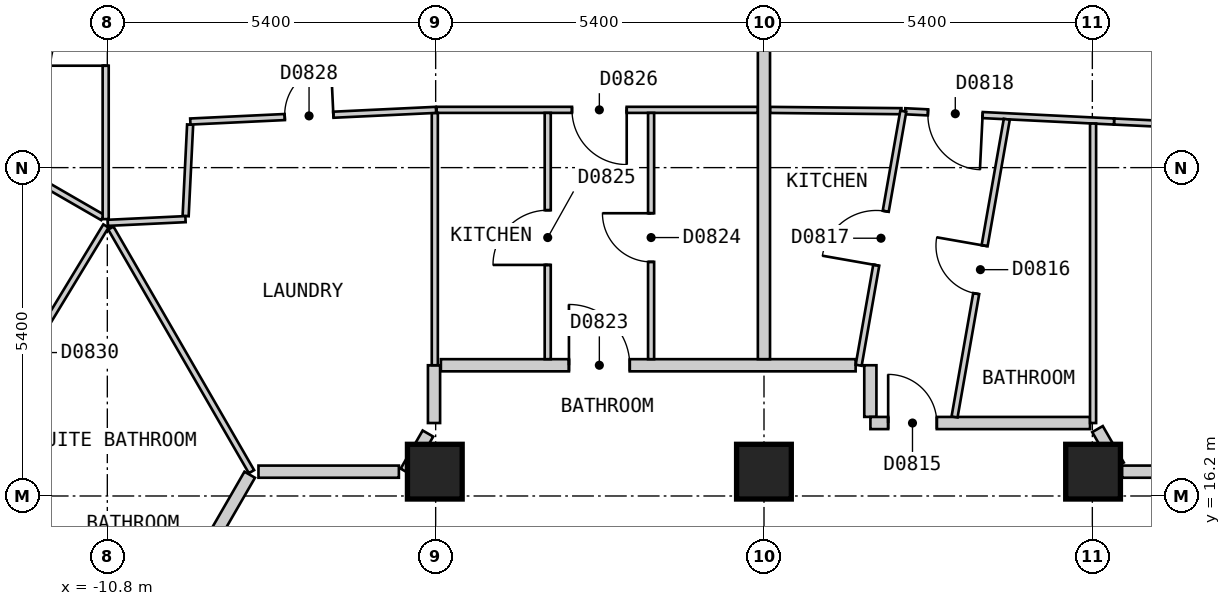
"""IFC4 building model, lengths in metres.
Left out: names, types, materials, properties, quantities, classifications, styles, units other than length and angle.
Written with IfcOpenShell. Run it as: python <this file> out.ifc"""

import sys

from ifc_helpers import new_model, si_unit, direction, frame, frame_2d, origin, origin_2d, place, context, subcontext, project, spatial, rectangle, extrude, element, fill, save


model = new_model("IFC4")
c1 = context("Model", 3, precision=1e-05, world=origin(), true_north=direction((0.0, 1.0)))
c2 = subcontext(c1, "Body", "Model", "MODEL_VIEW")
j1 = project(units=[si_unit("LENGTHUNIT", "METRE"), si_unit("PLANEANGLEUNIT", "RADIAN")], contexts=[c1])
p1 = place(None, origin())
s1 = spatial("IfcSite", under=j1, at=p1, CompositionType="ELEMENT")
p2 = place(p1, origin())
s2 = spatial("IfcBuilding", under=s1, at=p2, CompositionType="ELEMENT")
p3 = place(p2, frame((0.0, 0.0, 84.0)))
s3 = spatial("IfcBuildingStorey", under=s2, at=p3, CompositionType="ELEMENT", Elevation=84.0)
for number, where, z_axis, x_axis in (
    (1, (5.412, 16.6, 0.0), (0.0, 0.0, 1.0), (-1.0, 0.0, 0.0)),
    (2, (-0.001, 16.6, 0.0), (0.0, 0.0, 1.0), (-1.0, 0.0, 0.0)),
    (3, (-5.414, 16.6, 0.0), (0.0, 0.0, 1.0), (-1.0, 0.0, 0.0)),
):
    element("IfcColumn", number, at=place(p3, frame(where, z_axis=z_axis, x_axis=x_axis)), inside=s3, PredefinedType="COLUMN", context=c2, shape_type="SweptSolid", body=[
        extrude(rectangle(XDim=0.9, YDim=0.9, at=origin_2d()), origin(), (0.0, 0.0, 1.0), 3.0),
    ])
p4 = place(p3, frame((5.485, 17.3, 0.0), z_axis=(0.0, 0.0, 1.0), x_axis=(0.499437640892, -0.866349838611, 0.0)))
e4 = element("IfcWall", 4, at=p4, inside=s3, PredefinedType="PARTITIONING", context=c2, shape_type="SweptSolid", body=[
    extrude(rectangle(XDim=0.693, YDim=0.2, at=frame_2d((0.346, 0.0))), origin(), (0.0, 0.0, 1.0), 2.7),
])
p5 = place(p3, frame((1.749, 18.35, 0.0), z_axis=(0.0, 0.0, 1.0), x_axis=(0.0, -1.0, 0.0)))
e5 = element("IfcWall", 5, at=p5, inside=s3, PredefinedType="PARTITIONING", context=c2, shape_type="SweptSolid", body=[
    extrude(rectangle(XDim=0.849, YDim=0.2, at=frame_2d((0.425, 0.0))), origin(), (0.0, 0.0, 1.0), 2.7),
])
p6 = place(p3, frame((-8.314, 16.6, 0.0), z_axis=(0.0, 0.0, 1.0), x_axis=(1.0, 0.0, 0.0)))
e6 = element("IfcWall", 6, at=p6, inside=s3, PredefinedType="PARTITIONING", context=c2, shape_type="SweptSolid", body=[
    extrude(rectangle(XDim=2.309, YDim=0.2, at=frame_2d((1.155, 0.0))), origin(), (0.0, 0.0, 1.0), 2.7),
])
p7 = place(p3, frame((5.889, 16.6, 0.0), z_axis=(0.0, 0.0, 1.0), x_axis=(1.0, 0.0, 0.0)))
e7 = element("IfcWall", 7, at=p7, inside=s3, PredefinedType="PARTITIONING", context=c2, shape_type="SweptSolid", body=[
    extrude(rectangle(XDim=2.483, YDim=0.2, at=frame_2d((1.242, 0.0))), origin(), (0.0, 0.0, 1.0), 2.7),
])
p8 = place(p3, frame((1.75, 17.4, 0.0), z_axis=(0.0, 0.0, 1.0), x_axis=(1.0, 0.0, 0.0)))
e8 = element("IfcWall", 8, at=p8, inside=s3, PredefinedType="PARTITIONING", context=c2, shape_type="SweptSolid", body=[
    extrude(rectangle(XDim=3.612, YDim=0.2, at=frame_2d((1.806, 0.0))), origin(), (0.0, 0.0, 1.0), 2.7),
])
p9 = place(p8, frame((0.292, 0.0, 0.0)))
e9 = element("IfcOpeningElement", 9, at=p9, cuts=e8, PredefinedType="OPENING", context=c2, shape_type="SweptSolid", body=[
    extrude(rectangle(XDim=0.8, YDim=2.1, at=frame_2d((0.4, 1.05))), frame((0.0, 0.11, 0.0), z_axis=(0.0, -1.0, 0.0), x_axis=(1.0, 0.0, 0.0)), (0.0, 0.0, 1.0), 0.22),
])
p10 = place(p3, frame((-5.314, 18.35, 0.0), z_axis=(0.0, 0.0, 1.0), x_axis=(1.0, 0.0, 0.0)))
e10 = element("IfcWall", 10, at=p10, inside=s3, PredefinedType="PARTITIONING", context=c2, shape_type="SweptSolid", body=[
    extrude(rectangle(XDim=6.821, YDim=0.2, at=frame_2d((3.411, 0.0))), origin(), (0.0, 0.0, 1.0), 2.7),
])
p11 = place(p10, frame((2.106, 0.0, 0.0)))
e11 = element("IfcOpeningElement", 11, at=p11, cuts=e10, PredefinedType="OPENING", context=c2, shape_type="SweptSolid", body=[
    extrude(rectangle(XDim=1.0, YDim=2.1, at=frame_2d((0.5, 1.05))), frame((0.0, 0.11, 0.0), z_axis=(0.0, -1.0, 0.0), x_axis=(1.0, 0.0, 0.0)), (0.0, 0.0, 1.0), 0.22),
])
p12 = place(p3, frame((-5.889, 16.6, 0.0), z_axis=(0.0, 0.0, 1.0), x_axis=(0.499839240638, 0.866118198353, 0.0)))
e12 = element("IfcWall", 12, at=p12, inside=s3, PredefinedType="PARTITIONING", context=c2, shape_type="SweptSolid", body=[
    extrude(rectangle(XDim=0.724, YDim=0.2, at=frame_2d((0.362, 0.0))), origin(), (0.0, 0.0, 1.0), 2.7),
])
p13 = place(p3, frame((-18.562, -0.951, 0.0), z_axis=(0.0, 0.0, 1.0), x_axis=(0.499992962407, 0.866029466902, 0.0)))
e13 = element("IfcWall", 13, at=p13, inside=s3, PredefinedType="PARTITIONING", context=c2, shape_type="SweptSolid", body=[
    extrude(rectangle(XDim=20.208, YDim=0.2, at=frame_2d((10.104, 0.0))), origin(), (0.0, 0.0, 1.0), 2.7),
])
p14 = place(p13, frame((14.627, 0.0, 0.0)))
e14 = element("IfcOpeningElement", 14, at=p14, cuts=e13, PredefinedType="OPENING", context=c2, shape_type="SweptSolid", body=[
    extrude(rectangle(XDim=1.0, YDim=2.1, at=frame_2d((0.5, 1.05))), frame((0.0, 0.11, 0.0), z_axis=(0.0, -1.0, 0.0), x_axis=(1.0, 0.0, 0.0)), (0.0, 0.0, 1.0), 0.22),
])
p15 = place(p13, frame((4.581, 0.0, 0.0)))
e15 = element("IfcOpeningElement", 15, at=p15, cuts=e13, PredefinedType="OPENING", context=c2, shape_type="SweptSolid", body=[
    extrude(rectangle(XDim=1.0, YDim=2.1, at=frame_2d((0.5, 1.05))), frame((0.0, 0.11, 0.0), z_axis=(0.0, -1.0, 0.0), x_axis=(1.0, 0.0, 0.0)), (0.0, 0.0, 1.0), 0.22),
])
p16 = place(p3, frame((-5.427, 17.4, 0.0), z_axis=(0.0, 0.0, 1.0), x_axis=(0.0, 1.0, 0.0)))
e16 = element("IfcWall", 16, at=p16, inside=s3, PredefinedType="PARTITIONING", context=c2, shape_type="SweptSolid", body=[
    extrude(rectangle(XDim=0.95, YDim=0.2, at=frame_2d((0.475, 0.0))), origin(), (0.0, 0.0, 1.0), 2.7),
])
p17 = place(p3, frame((0.099, 22.549, 0.0), z_axis=(0.0, 0.0, 1.0), x_axis=(0.99995279897, -0.009715957599, 0.0)))
e17 = element("IfcWall", 17, at=p17, inside=s3, PredefinedType="PARTITIONING", context=c2, shape_type="SweptSolid", body=[
    extrude(rectangle(XDim=2.161, YDim=0.1, at=frame_2d((1.081, 0.0))), origin(), (0.0, 0.0, 1.0), 2.7),
])
p18 = place(p3, frame((-10.742, 20.606, 0.0), z_axis=(0.0, 0.0, 1.0), x_axis=(0.50003312339, -0.866006279142, 0.0)))
e18 = element("IfcWall", 18, at=p18, inside=s3, PredefinedType="PARTITIONING", context=c2, shape_type="SweptSolid", body=[
    extrude(rectangle(XDim=4.626, YDim=0.1, at=frame_2d((2.313, 0.0))), origin(), (0.0, 0.0, 1.0), 2.7),
])
p19 = place(p3, frame((5.757, 22.358, 0.0), z_axis=(0.0, 0.0, 1.0), x_axis=(0.998868690804, -0.047553533316, 0.0)))
e19 = element("IfcWall", 19, at=p19, inside=s3, PredefinedType="PARTITIONING", context=c2, shape_type="SweptSolid", body=[
    extrude(rectangle(XDim=1.997, YDim=0.1, at=frame_2d((0.999, 0.0))), origin(), (0.0, 0.0, 1.0), 2.7),
])
p20 = place(p3, frame((2.321, 22.527, 0.0), z_axis=(0.0, 0.0, 1.0), x_axis=(0.998789924329, -0.049180149038, 0.0)))
e20 = element("IfcWall", 20, at=p20, inside=s3, PredefinedType="PARTITIONING", context=c2, shape_type="SweptSolid", body=[
    extrude(rectangle(XDim=3.44, YDim=0.1, at=frame_2d((1.72, 0.0))), origin(), (0.0, 0.0, 1.0), 2.7),
])
p21 = place(p20, frame((0.376, 0.0, 0.0)))
e21 = element("IfcOpeningElement", 21, at=p21, cuts=e20, PredefinedType="OPENING", context=c2, shape_type="SweptSolid", body=[
    extrude(rectangle(XDim=0.9, YDim=2.1, at=frame_2d((0.45, 1.05))), frame((0.0, 0.06, 0.0), z_axis=(0.0, -1.0, 0.0), x_axis=(1.0, 0.0, 0.0)), (0.0, 0.0, 1.0), 0.12),
])
p22 = place(p3, frame((-15.977, 23.725, 0.0), z_axis=(0.0, 0.0, 1.0), x_axis=(0.866028213039, -0.499995134196, 0.0)))
e22 = element("IfcWall", 22, at=p22, inside=s3, PredefinedType="PARTITIONING", context=c2, shape_type="SweptSolid", body=[
    extrude(rectangle(XDim=5.89, YDim=0.1, at=frame_2d((2.945, 0.0))), origin(), (0.0, 0.0, 1.0), 2.7),
])
p23 = place(p22, frame((2.524, 0.0, 0.0)))
e23 = element("IfcOpeningElement", 23, at=p23, cuts=e22, PredefinedType="OPENING", context=c2, shape_type="SweptSolid", body=[
    extrude(rectangle(XDim=0.9, YDim=2.1, at=frame_2d((0.45, 1.05))), frame((0.0, 0.06, 0.0), z_axis=(0.0, -1.0, 0.0), x_axis=(1.0, 0.0, 0.0)), (0.0, 0.0, 1.0), 0.12),
])
p24 = place(p3, frame((-5.384, 22.55, 0.0), z_axis=(0.0, 0.0, 1.0), x_axis=(1.0, 0.0, 0.0)))
e24 = element("IfcWall", 24, at=p24, inside=s3, PredefinedType="PARTITIONING", context=c2, shape_type="SweptSolid", body=[
    extrude(rectangle(XDim=5.283, YDim=0.1, at=frame_2d((2.642, 0.0))), origin(), (0.0, 0.0, 1.0), 2.7),
])
p25 = place(p24, frame((2.226, 0.0, 0.0)))
e25 = element("IfcOpeningElement", 25, at=p25, cuts=e24, PredefinedType="OPENING", context=c2, shape_type="SweptSolid", body=[
    extrude(rectangle(XDim=0.9, YDim=2.1, at=frame_2d((0.45, 1.05))), frame((0.0, 0.06, 0.0), z_axis=(0.0, -1.0, 0.0), x_axis=(1.0, 0.0, 0.0)), (0.0, 0.0, 1.0), 0.12),
])
p26 = place(p3, frame((-13.328, 16.511, 0.0), z_axis=(0.0, 0.0, 1.0), x_axis=(0.518570528669, 0.855034857065, 0.0)))
e26 = element("IfcWall", 26, at=p26, inside=s3, PredefinedType="PARTITIONING", context=c2, shape_type="SweptSolid", body=[
    extrude(rectangle(XDim=4.83, YDim=0.1, at=frame_2d((2.415, 0.0))), origin(), (0.0, 0.0, 1.0), 2.7),
])
p27 = place(p26, frame((1.995, 0.0, 0.0)))
e27 = element("IfcOpeningElement", 27, at=p27, cuts=e26, PredefinedType="OPENING", context=c2, shape_type="SweptSolid", body=[
    extrude(rectangle(XDim=0.8, YDim=2.1, at=frame_2d((0.4, 1.05))), frame((0.0, 0.06, 0.0), z_axis=(0.0, -1.0, 0.0), x_axis=(1.0, 0.0, 0.0)), (0.0, 0.0, 1.0), 0.12),
])
p28 = place(p3, frame((3.134, 17.5, 0.0), z_axis=(0.0, 0.0, 1.0), x_axis=(0.172821216702, 0.984953210593, 0.0)))
e28 = element("IfcWall", 28, at=p28, inside=s3, PredefinedType="PARTITIONING", context=c2, shape_type="SweptSolid", body=[
    extrude(rectangle(XDim=4.97, YDim=0.1, at=frame_2d((2.485, 0.0))), origin(), (0.0, 0.0, 1.0), 2.7),
])
p29 = place(p28, frame((2.059, 0.0, 0.0)))
e29 = element("IfcOpeningElement", 29, at=p29, cuts=e28, PredefinedType="OPENING", context=c2, shape_type="SweptSolid", body=[
    extrude(rectangle(XDim=0.8, YDim=2.1, at=frame_2d((0.4, 1.05))), frame((0.0, 0.06, 0.0), z_axis=(0.0, -1.0, 0.0), x_axis=(1.0, 0.0, 0.0)), (0.0, 0.0, 1.0), 0.12),
])
p30 = place(p3, frame((1.557, 18.35, 0.0), z_axis=(0.0, 0.0, 1.0), x_axis=(0.173062973099, 0.984910761106, 0.0)))
e30 = element("IfcWall", 30, at=p30, inside=s3, PredefinedType="PARTITIONING", context=c2, shape_type="SweptSolid", body=[
    extrude(rectangle(XDim=4.242, YDim=0.1, at=frame_2d((2.121, 0.0))), origin(), (0.0, 0.0, 1.0), 2.7),
])
p31 = place(p30, frame((1.671, 0.0, 0.0)))
e31 = element("IfcOpeningElement", 31, at=p31, cuts=e30, PredefinedType="OPENING", context=c2, shape_type="SweptSolid", body=[
    extrude(rectangle(XDim=0.9, YDim=2.1, at=frame_2d((0.45, 1.05))), frame((0.0, 0.06, 0.0), z_axis=(0.0, -1.0, 0.0), x_axis=(1.0, 0.0, 0.0)), (0.0, 0.0, 1.0), 0.12),
])
p32 = place(p3, frame((-9.512, 20.803, 0.0), z_axis=(0.0, 0.0, 1.0), x_axis=(0.049089165168, 0.998794400196, 0.0)))
e32 = element("IfcWall", 32, at=p32, inside=s3, PredefinedType="PARTITIONING", context=c2, shape_type="SweptSolid", body=[
    extrude(rectangle(XDim=1.507, YDim=0.1, at=frame_2d((0.753, 0.0))), origin(), (0.0, 0.0, 1.0), 2.7),
])
p33 = place(p3, frame((5.412, 17.4, 0.0), z_axis=(0.0, 0.0, 1.0), x_axis=(0.0, 1.0, 0.0)))
e33 = element("IfcWall", 33, at=p33, inside=s3, PredefinedType="PARTITIONING", context=c2, shape_type="SweptSolid", body=[
    extrude(rectangle(XDim=4.925, YDim=0.1, at=frame_2d((2.462, 0.0))), origin(), (0.0, 0.0, 1.0), 2.7),
])
p34 = place(p3, frame((-3.557, 18.45, 0.0), z_axis=(0.0, 0.0, 1.0), x_axis=(0.0, 1.0, 0.0)))
e34 = element("IfcWall", 34, at=p34, inside=s3, PredefinedType="PARTITIONING", context=c2, shape_type="SweptSolid", body=[
    extrude(rectangle(XDim=4.05, YDim=0.1, at=frame_2d((2.025, 0.0))), origin(), (0.0, 0.0, 1.0), 2.7),
])
p35 = place(p34, frame((1.55, 0.0, 0.0)))
e35 = element("IfcOpeningElement", 35, at=p35, cuts=e34, PredefinedType="OPENING", context=c2, shape_type="SweptSolid", body=[
    extrude(rectangle(XDim=0.9, YDim=2.1, at=frame_2d((0.45, 1.05))), frame((0.0, 0.06, 0.0), z_axis=(0.0, -1.0, 0.0), x_axis=(1.0, 0.0, 0.0)), (0.0, 0.0, 1.0), 0.12),
])
p36 = place(p3, frame((-5.414, 18.35, 0.0), z_axis=(0.0, 0.0, 1.0), x_axis=(0.0, 1.0, 0.0)))
e36 = element("IfcWall", 36, at=p36, inside=s3, PredefinedType="PARTITIONING", context=c2, shape_type="SweptSolid", body=[
    extrude(rectangle(XDim=4.15, YDim=0.1, at=frame_2d((2.075, 0.0))), origin(), (0.0, 0.0, 1.0), 2.7),
])
p37 = place(p3, frame((-10.827, 20.753, 0.0), z_axis=(0.0, 0.0, 1.0), x_axis=(0.0, 1.0, 0.0)))
e37 = element("IfcWall", 37, at=p37, inside=s3, PredefinedType="PARTITIONING", context=c2, shape_type="SweptSolid", body=[
    extrude(rectangle(XDim=5.947, YDim=0.1, at=frame_2d((2.974, 0.0))), origin(), (0.0, 0.0, 1.0), 2.7),
])
p38 = place(p37, frame((2.523, 0.0, 0.0)))
e38 = element("IfcOpeningElement", 38, at=p38, cuts=e37, PredefinedType="OPENING", context=c2, shape_type="SweptSolid", body=[
    extrude(rectangle(XDim=0.9, YDim=2.1, at=frame_2d((0.45, 1.05))), frame((0.0, 0.06, 0.0), z_axis=(0.0, -1.0, 0.0), x_axis=(1.0, 0.0, 0.0)), (0.0, 0.0, 1.0), 0.12),
])
p39 = place(p3, frame((-1.857, 18.45, 0.0), z_axis=(0.0, 0.0, 1.0), x_axis=(0.0, 1.0, 0.0)))
e39 = element("IfcWall", 39, at=p39, inside=s3, PredefinedType="PARTITIONING", context=c2, shape_type="SweptSolid", body=[
    extrude(rectangle(XDim=4.05, YDim=0.1, at=frame_2d((2.025, 0.0))), origin(), (0.0, 0.0, 1.0), 2.7),
])
p40 = place(p39, frame((1.6, 0.0, 0.0)))
e40 = element("IfcOpeningElement", 40, at=p40, cuts=e39, PredefinedType="OPENING", context=c2, shape_type="SweptSolid", body=[
    extrude(rectangle(XDim=0.8, YDim=2.1, at=frame_2d((0.4, 1.05))), frame((0.0, 0.06, 0.0), z_axis=(0.0, -1.0, 0.0), x_axis=(1.0, 0.0, 0.0)), (0.0, 0.0, 1.0), 0.12),
])
p41 = place(p3, frame((-10.792, 20.692, 0.0), z_axis=(0.0, 0.0, 1.0), x_axis=(0.998861653202, 0.04770112957, 0.0)))
e41 = element("IfcWall", 41, at=p41, inside=s3, PredefinedType="PARTITIONING", context=c2, shape_type="SweptSolid", body=[
    extrude(rectangle(XDim=1.28, YDim=0.1, at=frame_2d((0.64, 0.0))), origin(), (0.0, 0.0, 1.0), 2.7),
])
p42 = place(p3, frame((-9.435, 22.358, 0.0), z_axis=(0.0, 0.0, 1.0), x_axis=(0.998871548472, 0.04749346959, 0.0)))
e42 = element("IfcWall", 42, at=p42, inside=s3, PredefinedType="PARTITIONING", context=c2, shape_type="SweptSolid", body=[
    extrude(rectangle(XDim=4.046, YDim=0.1, at=frame_2d((2.023, 0.0))), origin(), (0.0, 0.0, 1.0), 2.7),
])
p43 = place(p42, frame((1.555, 0.0, 0.0)))
e43 = element("IfcOpeningElement", 43, at=p43, cuts=e42, PredefinedType="OPENING", context=c2, shape_type="SweptSolid", body=[
    extrude(rectangle(XDim=0.8, YDim=2.1, at=frame_2d((0.4, 1.05))), frame((0.0, 0.06, 0.0), z_axis=(0.0, -1.0, 0.0), x_axis=(1.0, 0.0, 0.0)), (0.0, 0.0, 1.0), 0.12),
])
p44 = place(p3, frame((-18.489, 19.375, 0.0), z_axis=(0.0, 0.0, 1.0), x_axis=(0.866016855193, -0.500014806302, 0.0)))
e44 = element("IfcWall", 44, at=p44, inside=s3, PredefinedType="PARTITIONING", context=c2, shape_type="SweptSolid", body=[
    extrude(rectangle(XDim=10.0, YDim=0.2, at=frame_2d((5.0, 0.0))), origin(), (0.0, 0.0, 1.0), 2.7),
])
p45 = place(p3, frame((-0.001, 18.45, 0.0), z_axis=(0.0, 0.0, 1.0), x_axis=(0.0, 1.0, 0.0)))
e45 = element("IfcWall", 45, at=p45, inside=s3, PredefinedType="PARTITIONING", context=c2, shape_type="SweptSolid", body=[
    extrude(rectangle(XDim=8.25, YDim=0.2, at=frame_2d((4.125, 0.0))), origin(), (0.0, 0.0, 1.0), 2.7),
])
p46 = place(p9, origin())
e46 = element("IfcDoor", 46, at=p46, inside=s3, OperationType="SINGLE_SWING_LEFT", PredefinedType="DOOR", context=c2, shape_type="SweptSolid", body=[
    extrude(rectangle(XDim=0.8, YDim=2.1, at=frame_2d((0.4, 1.05))), frame((0.0, 0.025, 0.0), z_axis=(0.0, -1.0, 0.0), x_axis=(1.0, 0.0, 0.0)), (0.0, 0.0, 1.0), 0.05),
])
fill(e9, e46)
p47 = place(p29, origin())
e47 = element("IfcDoor", 47, at=p47, inside=s3, OperationType="SINGLE_SWING_RIGHT", PredefinedType="DOOR", context=c2, shape_type="SweptSolid", body=[
    extrude(rectangle(XDim=0.8, YDim=2.1, at=frame_2d((0.4, 1.05))), frame((0.0, 0.025, 0.0), z_axis=(0.0, -1.0, 0.0), x_axis=(1.0, 0.0, 0.0)), (0.0, 0.0, 1.0), 0.05),
])
fill(e29, e47)
p48 = place(p31, origin())
e48 = element("IfcDoor", 48, at=p48, inside=s3, OperationType="SINGLE_SWING_LEFT", PredefinedType="DOOR", context=c2, shape_type="SweptSolid", body=[
    extrude(rectangle(XDim=0.9, YDim=2.1, at=frame_2d((0.45, 1.05))), frame((0.0, 0.025, 0.0), z_axis=(0.0, -1.0, 0.0), x_axis=(1.0, 0.0, 0.0)), (0.0, 0.0, 1.0), 0.05),
])
fill(e31, e48)
p49 = place(p21, origin())
e49 = element("IfcDoor", 49, at=p49, inside=s3, OperationType="SINGLE_SWING_RIGHT", PredefinedType="DOOR", context=c2, shape_type="SweptSolid", body=[
    extrude(rectangle(XDim=0.9, YDim=2.1, at=frame_2d((0.45, 1.05))), frame((0.0, 0.025, 0.0), z_axis=(0.0, -1.0, 0.0), x_axis=(1.0, 0.0, 0.0)), (0.0, 0.0, 1.0), 0.05),
])
fill(e21, e49)
p50 = place(p11, origin())
e50 = element("IfcDoor", 50, at=p50, inside=s3, OperationType="SINGLE_SWING_LEFT", PredefinedType="DOOR", context=c2, shape_type="SweptSolid", body=[
    extrude(rectangle(XDim=1.0, YDim=2.1, at=frame_2d((0.5, 1.05))), frame((0.0, 0.025, 0.0), z_axis=(0.0, -1.0, 0.0), x_axis=(1.0, 0.0, 0.0)), (0.0, 0.0, 1.0), 0.05),
])
fill(e11, e50)
p51 = place(p40, origin())
e51 = element("IfcDoor", 51, at=p51, inside=s3, OperationType="SINGLE_SWING_RIGHT", PredefinedType="DOOR", context=c2, shape_type="SweptSolid", body=[
    extrude(rectangle(XDim=0.8, YDim=2.1, at=frame_2d((0.4, 1.05))), frame((0.0, 0.025, 0.0), z_axis=(0.0, -1.0, 0.0), x_axis=(1.0, 0.0, 0.0)), (0.0, 0.0, 1.0), 0.05),
])
fill(e40, e51)
p52 = place(p35, origin())
e52 = element("IfcDoor", 52, at=p52, inside=s3, OperationType="SINGLE_SWING_LEFT", PredefinedType="DOOR", context=c2, shape_type="SweptSolid", body=[
    extrude(rectangle(XDim=0.9, YDim=2.1, at=frame_2d((0.45, 1.05))), frame((0.0, 0.025, 0.0), z_axis=(0.0, -1.0, 0.0), x_axis=(1.0, 0.0, 0.0)), (0.0, 0.0, 1.0), 0.05),
])
fill(e35, e52)
p53 = place(p25, origin())
e53 = element("IfcDoor", 53, at=p53, inside=s3, OperationType="SINGLE_SWING_RIGHT", PredefinedType="DOOR", context=c2, shape_type="SweptSolid", body=[
    extrude(rectangle(XDim=0.9, YDim=2.1, at=frame_2d((0.45, 1.05))), frame((0.0, 0.025, 0.0), z_axis=(0.0, -1.0, 0.0), x_axis=(1.0, 0.0, 0.0)), (0.0, 0.0, 1.0), 0.05),
])
fill(e25, e53)
p54 = place(p38, origin())
e54 = element("IfcDoor", 54, at=p54, inside=s3, OperationType="SINGLE_SWING_LEFT", PredefinedType="DOOR", context=c2, shape_type="SweptSolid", body=[
    extrude(rectangle(XDim=0.9, YDim=2.1, at=frame_2d((0.45, 1.05))), frame((0.0, 0.025, 0.0), z_axis=(0.0, -1.0, 0.0), x_axis=(1.0, 0.0, 0.0)), (0.0, 0.0, 1.0), 0.05),
])
fill(e38, e54)
p55 = place(p43, origin())
e55 = element("IfcDoor", 55, at=p55, inside=s3, OperationType="SINGLE_SWING_RIGHT", PredefinedType="DOOR", context=c2, shape_type="SweptSolid", body=[
    extrude(rectangle(XDim=0.8, YDim=2.1, at=frame_2d((0.4, 1.05))), frame((0.0, 0.025, 0.0), z_axis=(0.0, -1.0, 0.0), x_axis=(1.0, 0.0, 0.0)), (0.0, 0.0, 1.0), 0.05),
])
fill(e43, e55)
save(model, sys.argv[1])
